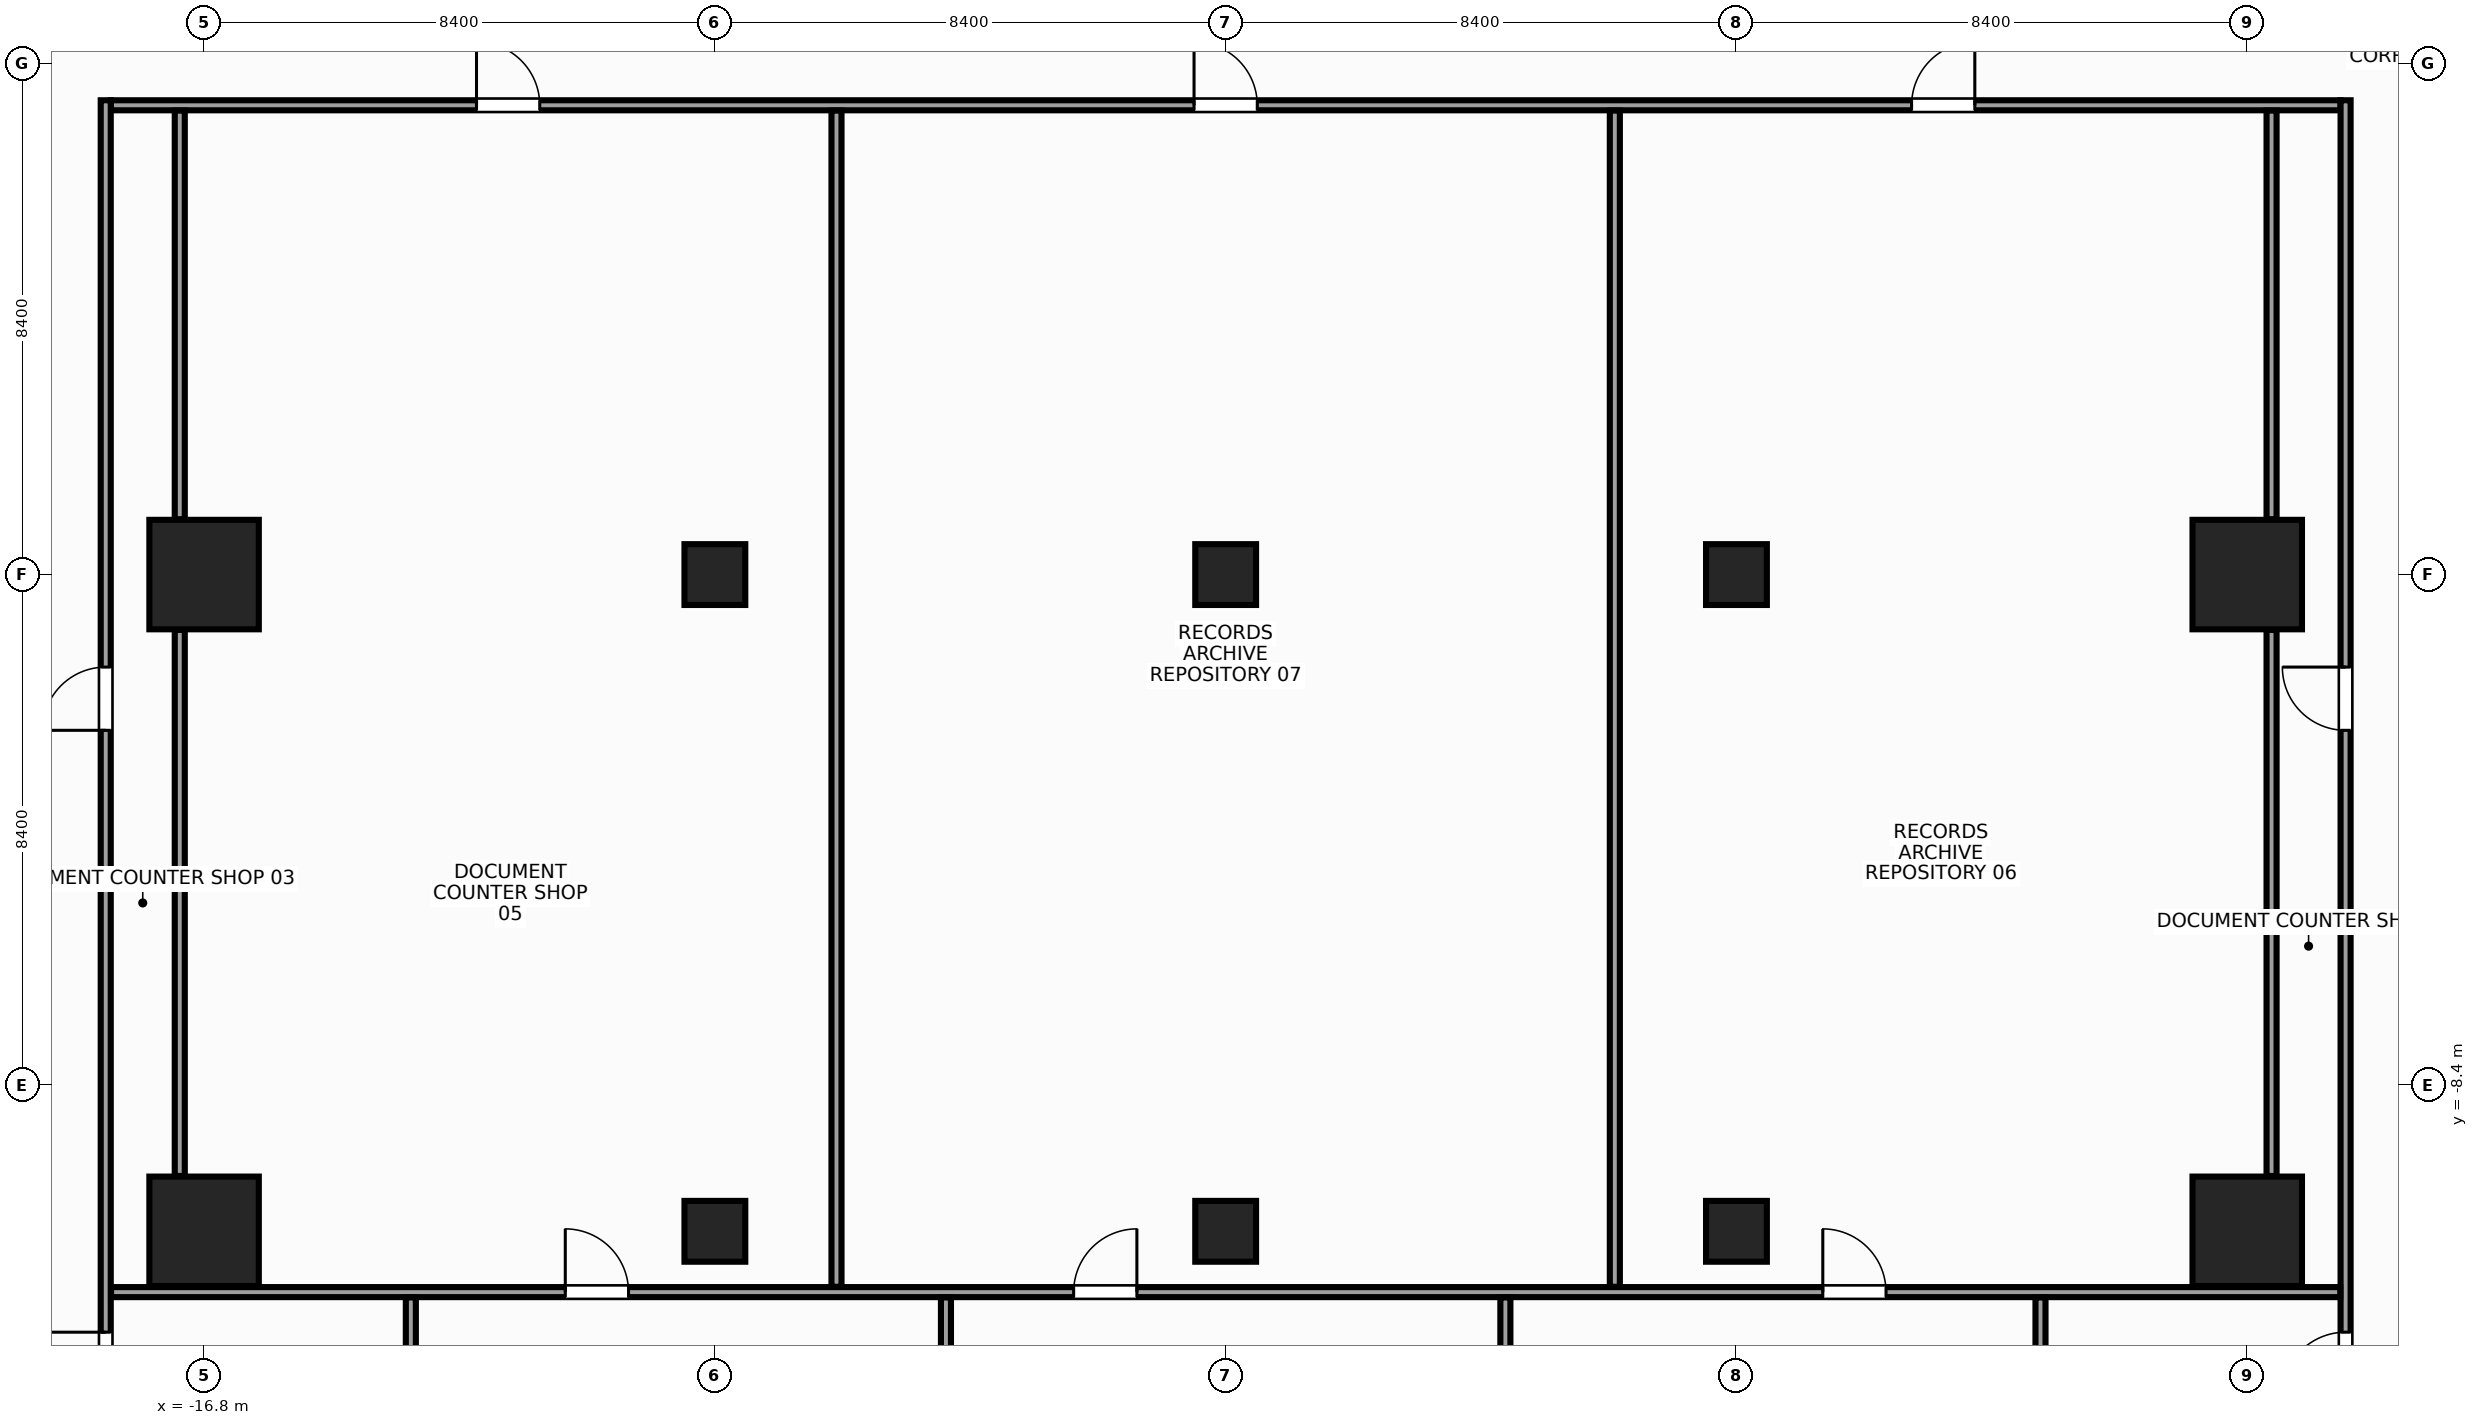
"""IFC4 building model, lengths in metres.
Left out: names, types, materials, properties, quantities, classifications, styles, units other than length and angle.
Written with IfcOpenShell. Run it as: python <this file> out.ifc"""

import sys

from ifc_helpers import new_model, si_unit, direction, frame, frame_2d, origin, origin_2d, place, context, subcontext, project, spatial, rectangle, hollow_rectangle, extrude, source, transform, mapped, element, fill, save


model = new_model("IFC4")
c1 = context("Model", 3, precision=1e-05, world=origin(), true_north=direction((0.0, 1.0)))
c2 = subcontext(c1, "Body", "Model", "MODEL_VIEW")
j1 = project(units=[si_unit("LENGTHUNIT", "METRE"), si_unit("PLANEANGLEUNIT", "RADIAN")], contexts=[c1])
p1 = place(None, origin())
s1 = spatial("IfcSite", under=j1, at=p1, CompositionType="ELEMENT")
p2 = place(p1, origin())
s2 = spatial("IfcBuilding", under=s1, at=p2, CompositionType="ELEMENT")
p3 = place(p2, frame((0.0, 0.0, 56.0)))
s3 = spatial("IfcBuildingStorey", under=s2, at=p3, CompositionType="ELEMENT", Elevation=56.0)
m1 = source(origin(), c2, "Body", "SweptSolid", [
    extrude(rectangle(XDim=1.8, YDim=1.8, at=origin_2d()), origin(), (0.0, 0.0, 1.0), 3.6),
])
for number, where, z_axis, x_axis in (
    (1, (-16.8, -10.8, 0.0), (0.0, 0.0, 1.0), (1.0, 0.0, 0.0)),
    (2, (-16.8, 0.0, 0.0), (0.0, 0.0, 1.0), (1.0, 0.0, 0.0)),
    (3, (16.8, -10.8, 0.0), (0.0, 0.0, 1.0), (1.0, 0.0, 0.0)),
    (4, (16.8, 0.0, 0.0), (0.0, 0.0, 1.0), (1.0, 0.0, 0.0)),
):
    element("IfcColumn", number, at=place(p3, frame(where, z_axis=z_axis, x_axis=x_axis)), inside=s3, PredefinedType="COLUMN", context=c2, shape_type="MappedRepresentation", body=[
        mapped(m1, transform((0.0, 0.0, 0.0), x_axis=(1.0, 0.0, 0.0), y_axis=(0.0, 1.0, 0.0), z_axis=(0.0, 0.0, 1.0), scale=1.0)),
    ])
m2 = source(origin(), c2, "Body", "SweptSolid", [
    extrude(hollow_rectangle(XDim=1.0, YDim=1.0, WallThickness=0.045, at=origin_2d()), origin(), (0.0, 0.0, 1.0), 3.6),
])
for number, where, z_axis, x_axis in (
    (5, (-8.4, 0.0, 0.0), (0.0, 0.0, 1.0), (1.0, 0.0, 0.0)),
    (6, (-8.4, -10.8, 0.0), (0.0, 0.0, 1.0), (1.0, 0.0, 0.0)),
    (7, (8.4, 0.0, 0.0), (0.0, 0.0, 1.0), (1.0, 0.0, 0.0)),
    (8, (8.4, -10.8, 0.0), (0.0, 0.0, 1.0), (1.0, 0.0, 0.0)),
):
    element("IfcColumn", number, at=place(p3, frame(where, z_axis=z_axis, x_axis=x_axis)), inside=s3, PredefinedType="COLUMN", context=c2, shape_type="MappedRepresentation", body=[
        mapped(m2, transform((0.0, 0.0, 0.0), x_axis=(1.0, 0.0, 0.0), y_axis=(0.0, 1.0, 0.0), z_axis=(0.0, 0.0, 1.0), scale=1.0)),
    ])
m3 = source(origin(), c2, "Body", "SweptSolid", [
    extrude(rectangle(XDim=1.0, YDim=1.0, at=origin_2d()), origin(), (0.0, 0.0, 1.0), 3.6),
])
for number, where, z_axis, x_axis in (
    (9, (0.0, -10.8, 0.0), (0.0, 0.0, 1.0), (1.0, 0.0, 0.0)),
    (10, (0.0, 0.0, 0.0), (0.0, 0.0, 1.0), (1.0, 0.0, 0.0)),
):
    element("IfcColumn", number, at=place(p3, frame(where, z_axis=z_axis, x_axis=x_axis)), inside=s3, PredefinedType="COLUMN", context=c2, shape_type="MappedRepresentation", body=[
        mapped(m3, transform((0.0, 0.0, 0.0), x_axis=(1.0, 0.0, 0.0), y_axis=(0.0, 1.0, 0.0), z_axis=(0.0, 0.0, 1.0), scale=1.0)),
    ])
m4 = source(origin(), c2, "Body", "SweptSolid", [
    extrude(rectangle(XDim=36.67, YDim=0.165, at=frame_2d((18.335, 0.0))), origin(), (0.0, 0.0, 1.0), 2.745),
])
p4 = place(p3, frame((-18.335, 7.718, 0.0), z_axis=(0.0, 0.0, 1.0), x_axis=(1.0, 0.0, 0.0)))
e11 = element("IfcWall", 11, at=p4, inside=s3, PredefinedType="PARTITIONING", context=c2, shape_type="MappedRepresentation", body=[
    mapped(m4, transform((0.0, 0.0, 0.0), x_axis=(1.0, 0.0, 0.0), y_axis=(0.0, 1.0, 0.0), z_axis=(0.0, 0.0, 1.0), scale=1.0)),
])
p5 = place(p4, frame((6.015, 0.0, 0.0)))
e12 = element("IfcOpeningElement", 12, at=p5, cuts=e11, PredefinedType="OPENING", context=c2, shape_type="SweptSolid", body=[
    extrude(rectangle(XDim=1.04, YDim=2.2, at=frame_2d((0.52, 1.1))), frame((0.0, 0.094, 0.0), z_axis=(0.0, -1.0, 0.0), x_axis=(1.0, 0.0, 0.0)), (0.0, 0.0, 1.0), 0.189),
])
p6 = place(p4, frame((29.615, 0.0, 0.0)))
e13 = element("IfcOpeningElement", 13, at=p6, cuts=e11, PredefinedType="OPENING", context=c2, shape_type="SweptSolid", body=[
    extrude(rectangle(XDim=1.04, YDim=2.2, at=frame_2d((0.52, 1.1))), frame((0.0, 0.094, 0.0), z_axis=(0.0, -1.0, 0.0), x_axis=(1.0, 0.0, 0.0)), (0.0, 0.0, 1.0), 0.189),
])
p7 = place(p4, frame((17.815, 0.0, 0.0)))
e14 = element("IfcOpeningElement", 14, at=p7, cuts=e11, PredefinedType="OPENING", context=c2, shape_type="SweptSolid", body=[
    extrude(rectangle(XDim=1.04, YDim=2.2, at=frame_2d((0.52, 1.1))), frame((0.0, 0.094, 0.0), z_axis=(0.0, -1.0, 0.0), x_axis=(1.0, 0.0, 0.0)), (0.0, 0.0, 1.0), 0.189),
])
m5 = source(origin(), c2, "Body", "SweptSolid", [
    extrude(rectangle(XDim=21.995, YDim=0.165, at=frame_2d((10.998, 0.0))), origin(), (0.0, 0.0, 1.0), 2.745),
])
p8 = place(p3, frame((-18.417, -14.195, 0.0), z_axis=(0.0, 0.0, 1.0), x_axis=(0.0, 1.0, 0.0)))
e15 = element("IfcWall", 15, at=p8, inside=s3, PredefinedType="PARTITIONING", context=c2, shape_type="MappedRepresentation", body=[
    mapped(m5, transform((0.0, 0.0, 0.0), x_axis=(1.0, 0.0, 0.0), y_axis=(0.0, 1.0, 0.0), z_axis=(0.0, 0.0, 1.0), scale=1.0)),
])
p9 = place(p8, frame((11.634, 0.0, 0.0)))
e16 = element("IfcOpeningElement", 16, at=p9, cuts=e15, PredefinedType="OPENING", context=c2, shape_type="SweptSolid", body=[
    extrude(rectangle(XDim=1.04, YDim=2.2, at=frame_2d((0.52, 1.1))), frame((0.0, 0.094, 0.0), z_axis=(0.0, -1.0, 0.0), x_axis=(1.0, 0.0, 0.0)), (0.0, 0.0, 1.0), 0.189),
])
p10 = place(p8, frame((0.696, 0.0, 0.0)))
e17 = element("IfcOpeningElement", 17, at=p10, cuts=e15, PredefinedType="OPENING", context=c2, shape_type="SweptSolid", body=[
    extrude(rectangle(XDim=1.04, YDim=2.2, at=frame_2d((0.52, 1.1))), frame((0.0, 0.094, 0.0), z_axis=(0.0, -1.0, 0.0), x_axis=(1.0, 0.0, 0.0)), (0.0, 0.0, 1.0), 0.189),
])
p11 = place(p3, frame((18.417, -14.195, 0.0), z_axis=(0.0, 0.0, 1.0), x_axis=(0.0, 1.0, 0.0)))
e18 = element("IfcWall", 18, at=p11, inside=s3, PredefinedType="PARTITIONING", context=c2, shape_type="MappedRepresentation", body=[
    mapped(m5, transform((0.0, 0.0, 0.0), x_axis=(1.0, 0.0, 0.0), y_axis=(0.0, 1.0, 0.0), z_axis=(0.0, 0.0, 1.0), scale=1.0)),
])
p12 = place(p11, frame((11.634, 0.0, 0.0)))
e19 = element("IfcOpeningElement", 19, at=p12, cuts=e18, PredefinedType="OPENING", context=c2, shape_type="SweptSolid", body=[
    extrude(rectangle(XDim=1.04, YDim=2.2, at=frame_2d((0.52, 1.1))), frame((0.0, 0.094, 0.0), z_axis=(0.0, -1.0, 0.0), x_axis=(1.0, 0.0, 0.0)), (0.0, 0.0, 1.0), 0.189),
])
p13 = place(p11, frame((0.696, 0.0, 0.0)))
e20 = element("IfcOpeningElement", 20, at=p13, cuts=e18, PredefinedType="OPENING", context=c2, shape_type="SweptSolid", body=[
    extrude(rectangle(XDim=1.04, YDim=2.2, at=frame_2d((0.52, 1.1))), frame((0.0, 0.094, 0.0), z_axis=(0.0, -1.0, 0.0), x_axis=(1.0, 0.0, 0.0)), (0.0, 0.0, 1.0), 0.189),
])
m6 = source(origin(), c2, "Body", "SweptSolid", [
    extrude(rectangle(XDim=36.66, YDim=0.165, at=frame_2d((18.33, 0.0))), origin(), (0.0, 0.0, 1.0), 2.945),
])
p14 = place(p3, frame((-18.33, -11.8, 0.0), z_axis=(0.0, 0.0, 1.0), x_axis=(1.0, 0.0, 0.0)))
e21 = element("IfcWall", 21, at=p14, inside=s3, PredefinedType="PARTITIONING", context=c2, shape_type="MappedRepresentation", body=[
    mapped(m6, transform((0.0, 0.0, 0.0), x_axis=(1.0, 0.0, 0.0), y_axis=(0.0, 1.0, 0.0), z_axis=(0.0, 0.0, 1.0), scale=1.0)),
])
p15 = place(p14, frame((7.47, 0.0, 0.0)))
e22 = element("IfcOpeningElement", 22, at=p15, cuts=e21, PredefinedType="OPENING", context=c2, shape_type="SweptSolid", body=[
    extrude(rectangle(XDim=1.04, YDim=2.2, at=frame_2d((0.52, 1.1))), frame((0.0, 0.094, 0.0), z_axis=(0.0, -1.0, 0.0), x_axis=(1.0, 0.0, 0.0)), (0.0, 0.0, 1.0), 0.189),
])
p16 = place(p14, frame((15.83, 0.0, 0.0)))
e23 = element("IfcOpeningElement", 23, at=p16, cuts=e21, PredefinedType="OPENING", context=c2, shape_type="SweptSolid", body=[
    extrude(rectangle(XDim=1.04, YDim=2.2, at=frame_2d((0.52, 1.1))), frame((0.0, 0.094, 0.0), z_axis=(0.0, -1.0, 0.0), x_axis=(1.0, 0.0, 0.0)), (0.0, 0.0, 1.0), 0.189),
])
p17 = place(p14, frame((28.15, 0.0, 0.0)))
e24 = element("IfcOpeningElement", 24, at=p17, cuts=e21, PredefinedType="OPENING", context=c2, shape_type="SweptSolid", body=[
    extrude(rectangle(XDim=1.04, YDim=2.2, at=frame_2d((0.52, 1.1))), frame((0.0, 0.094, 0.0), z_axis=(0.0, -1.0, 0.0), x_axis=(1.0, 0.0, 0.0)), (0.0, 0.0, 1.0), 0.189),
])
m7 = source(origin(), c2, "Body", "SweptSolid", [
    extrude(rectangle(XDim=8.98, YDim=0.165, at=frame_2d((4.49, 0.0))), origin(), (0.0, 0.0, 1.0), 3.36),
])
p18 = place(p3, frame((-17.2, -9.89, 0.0), z_axis=(0.0, 0.0, 1.0), x_axis=(0.0, 1.0, 0.0)))
e25 = element("IfcWall", 25, at=p18, inside=s3, PredefinedType="PARTITIONING", context=c2, shape_type="MappedRepresentation", body=[
    mapped(m7, transform((0.0, 0.0, 0.0), x_axis=(1.0, 0.0, 0.0), y_axis=(0.0, 1.0, 0.0), z_axis=(0.0, 0.0, 1.0), scale=1.0)),
])
m8 = source(origin(), c2, "Body", "SweptSolid", [
    extrude(rectangle(XDim=6.72, YDim=0.165, at=frame_2d((3.36, 0.0))), origin(), (0.0, 0.0, 1.0), 3.36),
])
p19 = place(p3, frame((-17.2, 0.91, 0.0), z_axis=(0.0, 0.0, 1.0), x_axis=(0.0, 1.0, 0.0)))
e26 = element("IfcWall", 26, at=p19, inside=s3, PredefinedType="PARTITIONING", context=c2, shape_type="MappedRepresentation", body=[
    mapped(m8, transform((0.0, 0.0, 0.0), x_axis=(1.0, 0.0, 0.0), y_axis=(0.0, 1.0, 0.0), z_axis=(0.0, 0.0, 1.0), scale=1.0)),
])
m9 = source(origin(), c2, "Body", "SweptSolid", [
    extrude(rectangle(XDim=19.342, YDim=0.165, at=frame_2d((9.671, 0.0))), origin(), (0.0, 0.0, 1.0), 2.645),
])
for number, where, z_axis, x_axis in (
    (27, (-6.4, -11.712, 0.0), (0.0, 0.0, 1.0), (0.0, 1.0, 0.0)),
    (28, (6.4, -11.712, 0.0), (0.0, 0.0, 1.0), (0.0, 1.0, 0.0)),
):
    element("IfcWall", number, at=place(p3, frame(where, z_axis=z_axis, x_axis=x_axis)), inside=s3, PredefinedType="PARTITIONING", context=c2, shape_type="MappedRepresentation", body=[
        mapped(m9, transform((0.0, 0.0, 0.0), x_axis=(1.0, 0.0, 0.0), y_axis=(0.0, 1.0, 0.0), z_axis=(0.0, 0.0, 1.0), scale=1.0)),
    ])
p20 = place(p3, frame((17.2, -9.89, 0.0), z_axis=(0.0, 0.0, 1.0), x_axis=(0.0, 1.0, 0.0)))
e29 = element("IfcWall", 29, at=p20, inside=s3, PredefinedType="PARTITIONING", context=c2, shape_type="MappedRepresentation", body=[
    mapped(m7, transform((0.0, 0.0, 0.0), x_axis=(1.0, 0.0, 0.0), y_axis=(0.0, 1.0, 0.0), z_axis=(0.0, 0.0, 1.0), scale=1.0)),
])
p21 = place(p3, frame((17.2, 0.91, 0.0), z_axis=(0.0, 0.0, 1.0), x_axis=(0.0, 1.0, 0.0)))
e30 = element("IfcWall", 30, at=p21, inside=s3, PredefinedType="PARTITIONING", context=c2, shape_type="MappedRepresentation", body=[
    mapped(m8, transform((0.0, 0.0, 0.0), x_axis=(1.0, 0.0, 0.0), y_axis=(0.0, 1.0, 0.0), z_axis=(0.0, 0.0, 1.0), scale=1.0)),
])
m10 = source(origin(), c2, "Body", "SweptSolid", [
    extrude(rectangle(XDim=14.963, YDim=0.165, at=frame_2d((7.481, 0.0))), origin(), (0.0, 0.0, 1.0), 2.745),
])
for number, where, z_axis, x_axis in (
    (31, (-13.4, -26.85, 0.0), (0.0, 0.0, 1.0), (0.0, 1.0, 0.0)),
    (32, (-4.6, -26.85, 0.0), (0.0, 0.0, 1.0), (0.0, 1.0, 0.0)),
    (33, (4.6, -26.85, 0.0), (0.0, 0.0, 1.0), (0.0, 1.0, 0.0)),
    (34, (13.4, -26.85, 0.0), (0.0, 0.0, 1.0), (0.0, 1.0, 0.0)),
):
    element("IfcWall", number, at=place(p3, frame(where, z_axis=z_axis, x_axis=x_axis)), inside=s3, PredefinedType="PARTITIONING", context=c2, shape_type="MappedRepresentation", body=[
        mapped(m10, transform((0.0, 0.0, 0.0), x_axis=(1.0, 0.0, 0.0), y_axis=(0.0, 1.0, 0.0), z_axis=(0.0, 0.0, 1.0), scale=1.0)),
    ])
m11 = source(origin(), c2, "Body", "SweptSolid", [
    extrude(rectangle(XDim=1.04, YDim=2.2, at=frame_2d((0.52, 1.1))), frame((0.0, 0.025, 0.0), z_axis=(0.0, -1.0, 0.0), x_axis=(1.0, 0.0, 0.0)), (0.0, 0.0, 1.0), 0.05),
])
p22 = place(p9, origin())
e35 = element("IfcDoor", 35, at=p22, inside=s3, OperationType="SINGLE_SWING_LEFT", PredefinedType="DOOR", context=c2, shape_type="MappedRepresentation", body=[
    mapped(m11, transform((0.0, 0.0, 0.0), x_axis=(1.0, 0.0, 0.0), y_axis=(0.0, 1.0, 0.0), z_axis=(0.0, 0.0, 1.0), scale=1.0)),
])
fill(e16, e35)
p23 = place(p12, origin())
e36 = element("IfcDoor", 36, at=p23, inside=s3, OperationType="SINGLE_SWING_RIGHT", PredefinedType="DOOR", context=c2, shape_type="MappedRepresentation", body=[
    mapped(m11, transform((0.0, 0.0, 0.0), x_axis=(1.0, 0.0, 0.0), y_axis=(0.0, 1.0, 0.0), z_axis=(0.0, 0.0, 1.0), scale=1.0)),
])
fill(e19, e36)
p24 = place(p5, origin())
e37 = element("IfcDoor", 37, at=p24, inside=s3, OperationType="SINGLE_SWING_LEFT", PredefinedType="DOOR", context=c2, shape_type="MappedRepresentation", body=[
    mapped(m11, transform((0.0, 0.0, 0.0), x_axis=(1.0, 0.0, 0.0), y_axis=(0.0, 1.0, 0.0), z_axis=(0.0, 0.0, 1.0), scale=1.0)),
])
fill(e12, e37)
p25 = place(p6, origin())
e38 = element("IfcDoor", 38, at=p25, inside=s3, OperationType="SINGLE_SWING_RIGHT", PredefinedType="DOOR", context=c2, shape_type="MappedRepresentation", body=[
    mapped(m11, transform((0.0, 0.0, 0.0), x_axis=(1.0, 0.0, 0.0), y_axis=(0.0, 1.0, 0.0), z_axis=(0.0, 0.0, 1.0), scale=1.0)),
])
fill(e13, e38)
p26 = place(p7, origin())
e39 = element("IfcDoor", 39, at=p26, inside=s3, OperationType="SINGLE_SWING_LEFT", PredefinedType="DOOR", context=c2, shape_type="MappedRepresentation", body=[
    mapped(m11, transform((0.0, 0.0, 0.0), x_axis=(1.0, 0.0, 0.0), y_axis=(0.0, 1.0, 0.0), z_axis=(0.0, 0.0, 1.0), scale=1.0)),
])
fill(e14, e39)
p27 = place(p10, origin())
e40 = element("IfcDoor", 40, at=p27, inside=s3, OperationType="SINGLE_SWING_RIGHT", PredefinedType="DOOR", context=c2, shape_type="MappedRepresentation", body=[
    mapped(m11, transform((0.0, 0.0, 0.0), x_axis=(1.0, 0.0, 0.0), y_axis=(0.0, 1.0, 0.0), z_axis=(0.0, 0.0, 1.0), scale=1.0)),
])
fill(e17, e40)
p28 = place(p13, origin())
e41 = element("IfcDoor", 41, at=p28, inside=s3, OperationType="SINGLE_SWING_LEFT", PredefinedType="DOOR", context=c2, shape_type="MappedRepresentation", body=[
    mapped(m11, transform((0.0, 0.0, 0.0), x_axis=(1.0, 0.0, 0.0), y_axis=(0.0, 1.0, 0.0), z_axis=(0.0, 0.0, 1.0), scale=1.0)),
])
fill(e20, e41)
p29 = place(p15, origin())
e42 = element("IfcDoor", 42, at=p29, inside=s3, OperationType="SINGLE_SWING_LEFT", PredefinedType="DOOR", context=c2, shape_type="MappedRepresentation", body=[
    mapped(m11, transform((0.0, 0.0, 0.0), x_axis=(1.0, 0.0, 0.0), y_axis=(0.0, 1.0, 0.0), z_axis=(0.0, 0.0, 1.0), scale=1.0)),
])
fill(e22, e42)
p30 = place(p16, origin())
e43 = element("IfcDoor", 43, at=p30, inside=s3, OperationType="SINGLE_SWING_RIGHT", PredefinedType="DOOR", context=c2, shape_type="MappedRepresentation", body=[
    mapped(m11, transform((0.0, 0.0, 0.0), x_axis=(1.0, 0.0, 0.0), y_axis=(0.0, 1.0, 0.0), z_axis=(0.0, 0.0, 1.0), scale=1.0)),
])
fill(e23, e43)
p31 = place(p17, origin())
e44 = element("IfcDoor", 44, at=p31, inside=s3, OperationType="SINGLE_SWING_LEFT", PredefinedType="DOOR", context=c2, shape_type="MappedRepresentation", body=[
    mapped(m11, transform((0.0, 0.0, 0.0), x_axis=(1.0, 0.0, 0.0), y_axis=(0.0, 1.0, 0.0), z_axis=(0.0, 0.0, 1.0), scale=1.0)),
])
fill(e24, e44)
save(model, sys.argv[1])
